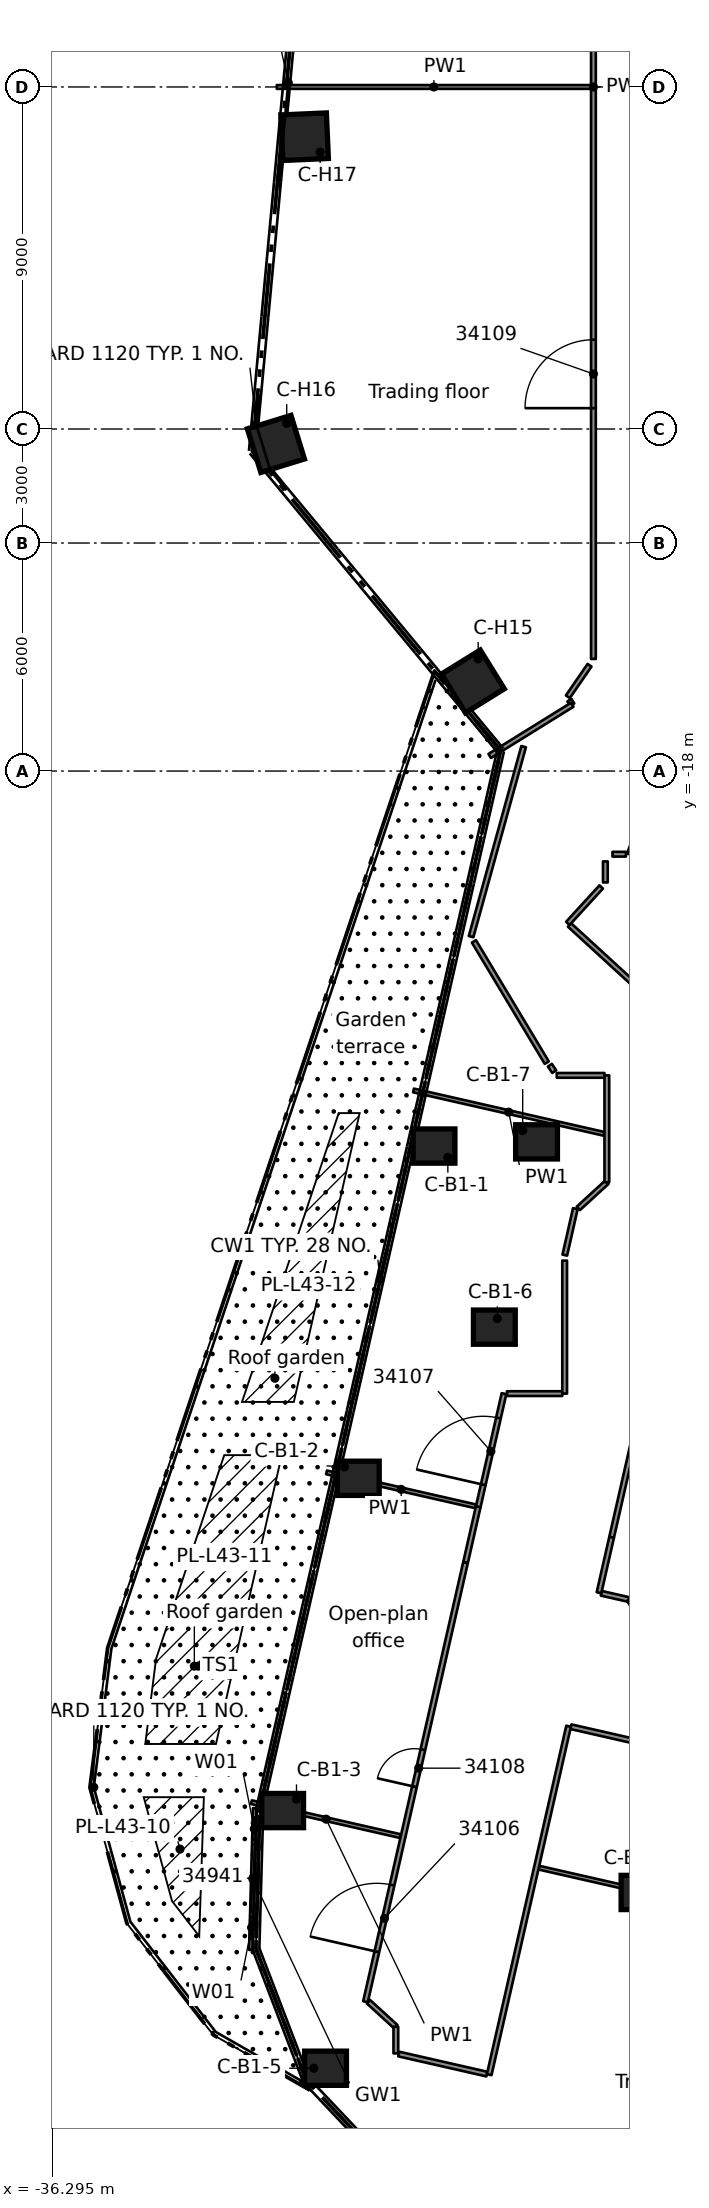
"""IFC4 building model, lengths in metres.
Left out: names, types, materials, properties, quantities, classifications, styles, units other than length and angle.
Written with IfcOpenShell. Run it as: python <this file> out.ifc"""

import sys

from ifc_helpers import new_model, si_unit, direction, frame, frame_2d, origin, origin_2d, place, context, subcontext, project, spatial, rectangle, extrude, element, fill, save


model = new_model("IFC4")
c1 = context("Model", 3, precision=1e-05, world=origin(), true_north=direction((0.0, 1.0)))
c2 = subcontext(c1, "Body", "Model", "MODEL_VIEW")
j1 = project(units=[si_unit("LENGTHUNIT", "METRE"), si_unit("PLANEANGLEUNIT", "RADIAN")], contexts=[c1])
p1 = place(None, origin())
s1 = spatial("IfcSite", under=j1, at=p1, CompositionType="ELEMENT")
p2 = place(p1, origin())
s2 = spatial("IfcBuilding", under=s1, at=p2, CompositionType="ELEMENT")
p3 = place(p2, frame((0.0, 0.0, 167.1)))
s3 = spatial("IfcBuildingStorey", under=s2, at=p3, CompositionType="ELEMENT", Elevation=167.1)
for number, where, z_axis, x_axis in (
    (1, (-26.245, -27.867, 0.0), (0.0, 0.0, 1.0), (1.0, 0.0, 0.0)),
    (2, (-28.237, -36.609, 0.0), (0.0, 0.0, 1.0), (1.0, 0.0, 0.0)),
    (3, (-30.228, -45.352, 0.0), (0.0, 0.0, 1.0), (1.0, 0.0, 0.0)),
    (4, (-29.099, -52.132, 0.0), (0.0, 0.0, 1.0), (1.0, 0.0, 0.0)),
    (5, (-24.657, -32.632, 0.0), (0.0, 0.0, 1.0), (1.0, 0.0, 0.0)),
    (6, (-23.547, -27.757, 0.0), (0.0, 0.0, 1.0), (1.0, 0.0, 0.0)),
    (7, (-20.771, -47.507, 0.0), (0.0, 0.0, 1.0), (1.0, 0.0, 0.0)),
):
    element("IfcColumn", number, at=place(p3, frame(where, z_axis=z_axis, x_axis=x_axis)), inside=s3, PredefinedType="COLUMN", context=c2, shape_type="SweptSolid", body=[
        extrude(rectangle(XDim=1.1, YDim=0.9, at=origin_2d()), origin(), (0.0, 0.0, 1.0), 3.5),
    ])
for number, where, z_axis, x_axis in (
    (8, (-25.222, -15.642, 0.0), (0.0, 0.0, 1.0), (-0.85, -0.527, 0.0)),
    (9, (-30.405, -9.392, 0.0), (0.0, 0.0, 1.0), (-0.955, -0.295, 0.0)),
    (10, (-29.65, -1.309, 0.0), (0.0, 0.0, 1.0), (-0.999, -0.044, 0.0)),
):
    element("IfcColumn", number, at=place(p3, frame(where, z_axis=z_axis, x_axis=x_axis)), inside=s3, PredefinedType="COLUMN", context=c2, shape_type="SweptSolid", body=[
        extrude(rectangle(XDim=1.2, YDim=1.2, at=origin_2d()), origin(), (0.0, 0.0, 1.0), 3.5),
    ])
p4 = place(p3, frame((-31.062, -49.018, 0.0), z_axis=(0.0, 0.0, 1.0), x_axis=(0.027750717401, 0.999614874681, 0.0)))
e11 = element("IfcWall", 11, at=p4, inside=s3, PredefinedType="STANDARD", context=c2, shape_type="SweptSolid", body=[
    extrude(rectangle(XDim=3.73, YDim=0.1, at=frame_2d((1.865, 0.0))), origin(), (0.0, 0.0, 1.0), 3.08),
])
p5 = place(p4, frame((0.986, 0.0, 0.0)))
e12 = element("IfcOpeningElement", 12, at=p5, cuts=e11, PredefinedType="OPENING", context=c2, shape_type="SweptSolid", body=[
    extrude(rectangle(XDim=1.8, YDim=2.4, at=frame_2d((0.9, 1.2))), frame((0.0, 0.06, 0.0), z_axis=(0.0, -1.0, 0.0), x_axis=(1.0, 0.0, 0.0)), (0.0, 0.0, 1.0), 0.12),
])
p6 = place(p4, frame((0.286, 0.0, 0.0)))
e13 = element("IfcOpeningElement", 13, at=p6, cuts=e11, PredefinedType="OPENING", context=c2, shape_type="SweptSolid", body=[
    extrude(rectangle(XDim=0.6, YDim=2.4, at=frame_2d((0.3, 1.2))), frame((0.0, 0.06, 0.0), z_axis=(0.0, -1.0, 0.0), x_axis=(1.0, 0.0, 0.0)), (0.0, 0.0, 1.0), 0.12),
])
p7 = place(p4, frame((2.886, 0.0, 0.0)))
e14 = element("IfcOpeningElement", 14, at=p7, cuts=e11, PredefinedType="OPENING", context=c2, shape_type="SweptSolid", body=[
    extrude(rectangle(XDim=0.6, YDim=2.4, at=frame_2d((0.3, 1.2))), frame((0.0, 0.06, 0.0), z_axis=(0.0, -1.0, 0.0), x_axis=(1.0, 0.0, 0.0)), (0.0, 0.0, 1.0), 0.12),
])
p8 = place(p3, frame((-25.194, -22.482, 0.0), z_axis=(0.0, 0.0, 1.0), x_axis=(0.514871972741, -0.857267083053, 0.0)))
e15 = element("IfcWall", 15, at=p8, inside=s3, PredefinedType="PARTITIONING", context=c2, shape_type="SweptSolid", body=[
    extrude(rectangle(XDim=3.721, YDim=0.125, at=frame_2d((1.861, 0.0))), origin(), (0.0, 0.0, 1.0), 3.06),
])
p9 = place(p3, frame((-22.682, -16.135, 0.0), z_axis=(0.0, 0.0, 1.0), x_axis=(0.530154156877, -0.847901273702, 0.0)))
e16 = element("IfcWall", 16, at=p9, inside=s3, PredefinedType="PARTITIONING", context=c2, shape_type="SweptSolid", body=[
    extrude(rectangle(XDim=0.141, YDim=0.125, at=frame_2d((0.071, 0.0))), origin(), (0.0, 0.0, 1.0), 3.06),
])
p10 = place(p3, frame((-23.196, -25.74, 0.0), z_axis=(0.0, 0.0, 1.0), x_axis=(0.562669402068, -0.826682008983, 0.0)))
e17 = element("IfcWall", 17, at=p10, inside=s3, PredefinedType="PARTITIONING", context=c2, shape_type="SweptSolid", body=[
    extrude(rectangle(XDim=0.204, YDim=0.125, at=frame_2d((0.102, 0.0))), origin(), (0.0, 0.0, 1.0), 3.06),
])
p11 = place(p3, frame((-22.678, -22.051, 0.0), z_axis=(0.0, 0.0, 1.0), x_axis=(0.737457793855, -0.675393220489, 0.0)))
e18 = element("IfcWall", 18, at=p11, inside=s3, PredefinedType="PARTITIONING", context=c2, shape_type="SweptSolid", body=[
    extrude(rectangle(XDim=3.737, YDim=0.125, at=frame_2d((1.869, 0.0))), origin(), (0.0, 0.0, 1.0), 3.06),
])
p12 = place(p3, frame((-27.173, -51.758, 0.0), z_axis=(0.0, 0.0, 1.0), x_axis=(0.975083442677, -0.221838409246, 0.0)))
e19 = element("IfcWall", 19, at=p12, inside=s3, PredefinedType="PARTITIONING", context=c2, shape_type="SweptSolid", body=[
    extrude(rectangle(XDim=2.379, YDim=0.125, at=frame_2d((1.19, 0.0))), origin(), (0.0, 0.0, 1.0), 3.06),
])
p13 = place(p3, frame((-31.049, -45.131, 0.0), z_axis=(0.0, 0.0, 1.0), x_axis=(0.975034558325, -0.222053169469, 0.0)))
e20 = element("IfcWall", 20, at=p13, inside=s3, PredefinedType="PARTITIONING", context=c2, shape_type="SweptSolid", body=[
    extrude(rectangle(XDim=4.03, YDim=0.1, at=frame_2d((2.015, 0.0))), origin(), (0.0, 0.0, 1.0), 3.06),
])
p14 = place(p3, frame((-23.487, -46.854, 0.0), z_axis=(0.0, 0.0, 1.0), x_axis=(0.975033161008, -0.222059304997, 0.0)))
e21 = element("IfcWall", 21, at=p14, inside=s3, PredefinedType="PARTITIONING", context=c2, shape_type="SweptSolid", body=[
    extrude(rectangle(XDim=24.007, YDim=0.1, at=frame_2d((12.004, 0.0))), origin(), (0.0, 0.0, 1.0), 3.06),
])
p15 = place(p3, frame((0.255, -48.363, 0.0), z_axis=(0.0, 0.0, 1.0), x_axis=(-0.975011387461, 0.222154888135, 0.0)))
e22 = element("IfcWall", 22, at=p15, inside=s3, PredefinedType="PARTITIONING", context=c2, shape_type="SweptSolid", body=[
    extrude(rectangle(XDim=23.484, YDim=0.125, at=frame_2d((11.742, 0.0))), origin(), (0.0, 0.0, 1.0), 3.06),
])
p16 = place(p15, frame((6.036, 0.0, 0.0)))
e23 = element("IfcOpeningElement", 23, at=p16, cuts=e22, PredefinedType="OPENING", context=c2, shape_type="SweptSolid", body=[
    extrude(rectangle(XDim=0.9, YDim=2.1, at=frame_2d((0.45, 1.05))), frame((0.0, 0.073, 0.0), z_axis=(0.0, -1.0, 0.0), x_axis=(1.0, 0.0, 0.0)), (0.0, 0.0, 1.0), 0.145),
])
p17 = place(p15, frame((15.494, 0.0, 0.0)))
e24 = element("IfcOpeningElement", 24, at=p17, cuts=e22, PredefinedType="OPENING", context=c2, shape_type="SweptSolid", body=[
    extrude(rectangle(XDim=1.1, YDim=2.1, at=frame_2d((0.55, 1.05))), frame((0.0, 0.073, 0.0), z_axis=(0.0, -1.0, 0.0), x_axis=(1.0, 0.0, 0.0)), (0.0, 0.0, 1.0), 0.145),
])
p18 = place(p3, frame((-21.842, -39.635, 0.0), z_axis=(0.0, 0.0, 1.0), x_axis=(0.975061856112, -0.221933270953, 0.0)))
e25 = element("IfcWall", 25, at=p18, inside=s3, PredefinedType="PARTITIONING", context=c2, shape_type="SweptSolid", body=[
    extrude(rectangle(XDim=0.744, YDim=0.125, at=frame_2d((0.372, 0.0))), origin(), (0.0, 0.0, 1.0), 3.06),
])
p19 = place(p3, frame((-29.073, -36.453, 0.0), z_axis=(0.0, 0.0, 1.0), x_axis=(0.975033390533, -0.222058297179, 0.0)))
e26 = element("IfcWall", 26, at=p19, inside=s3, PredefinedType="PARTITIONING", context=c2, shape_type="SweptSolid", body=[
    extrude(rectangle(XDim=4.031, YDim=0.1, at=frame_2d((2.015, 0.0))), origin(), (0.0, 0.0, 1.0), 3.06),
])
p20 = place(p3, frame((-26.784, -26.404, 0.0), z_axis=(0.0, 0.0, 1.0), x_axis=(0.975025922796, -0.22209108464, 0.0)))
e27 = element("IfcWall", 27, at=p20, inside=s3, PredefinedType="PARTITIONING", context=c2, shape_type="SweptSolid", body=[
    extrude(rectangle(XDim=5.141, YDim=0.1, at=frame_2d((2.571, 0.0))), origin(), (0.0, 0.0, 1.0), 3.06),
])
p21 = place(p3, frame((-27.97, -50.382, 0.0), z_axis=(0.0, 0.0, 1.0), x_axis=(0.738637101111, -0.67410328056, 0.0)))
e28 = element("IfcWall", 28, at=p21, inside=s3, PredefinedType="PARTITIONING", context=c2, shape_type="SweptSolid", body=[
    extrude(rectangle(XDim=0.976, YDim=0.125, at=frame_2d((0.488, 0.0))), origin(), (0.0, 0.0, 1.0), 3.06),
])
p22 = place(p3, frame((-24.325, -34.381, 0.0), z_axis=(0.0, 0.0, 1.0), x_axis=(1.0, 0.0, 0.0)))
e29 = element("IfcWall", 29, at=p22, inside=s3, PredefinedType="PARTITIONING", context=c2, shape_type="SweptSolid", body=[
    extrude(rectangle(XDim=1.456, YDim=0.125, at=frame_2d((0.728, 0.0))), origin(), (0.0, 0.0, 1.0), 3.06),
])
p23 = place(p3, frame((-22.447, -29.507, 0.0), z_axis=(0.0, 0.0, 1.0), x_axis=(0.737393225099, 0.67546371596, 0.0)))
e30 = element("IfcWall", 30, at=p23, inside=s3, PredefinedType="PARTITIONING", context=c2, shape_type="SweptSolid", body=[
    extrude(rectangle(XDim=1.017, YDim=0.125, at=frame_2d((0.509, 0.0))), origin(), (0.0, 0.0, 1.0), 3.06),
])
p24 = place(p3, frame((-23.014, -26.007, 0.0), z_axis=(0.0, 0.0, 1.0), x_axis=(1.0, 0.0, 0.0)))
e31 = element("IfcWall", 31, at=p24, inside=s3, PredefinedType="PARTITIONING", context=c2, shape_type="SweptSolid", body=[
    extrude(rectangle(XDim=1.255, YDim=0.125, at=frame_2d((0.627, 0.0))), origin(), (0.0, 0.0, 1.0), 3.06),
])
p25 = place(p3, frame((-21.548, -20.188, 0.0), z_axis=(0.0, 0.0, 1.0), x_axis=(1.0, 0.0, 0.0)))
e32 = element("IfcWall", 32, at=p25, inside=s3, PredefinedType="PARTITIONING", context=c2, shape_type="SweptSolid", body=[
    extrude(rectangle(XDim=0.354, YDim=0.125, at=frame_2d((0.177, 0.0))), origin(), (0.0, 0.0, 1.0), 3.06),
])
p26 = place(p3, frame((-30.382, 0.0, 0.0), z_axis=(0.0, 0.0, 1.0), x_axis=(1.0, 0.0, 0.0)))
e33 = element("IfcWall", 33, at=p26, inside=s3, PredefinedType="PARTITIONING", context=c2, shape_type="SweptSolid", body=[
    extrude(rectangle(XDim=8.269, YDim=0.1, at=frame_2d((4.135, 0.0))), origin(), (0.0, 0.0, 1.0), 3.06),
])
p27 = place(p3, frame((-24.779, -17.603, 0.0), z_axis=(0.0, 0.0, 1.0), x_axis=(0.849651970117, 0.527343843878, 0.0)))
e34 = element("IfcWall", 34, at=p27, inside=s3, PredefinedType="PARTITIONING", context=c2, shape_type="SweptSolid", body=[
    extrude(rectangle(XDim=2.556, YDim=0.125, at=frame_2d((1.278, 0.0))), origin(), (0.0, 0.0, 1.0), 3.06),
])
p28 = place(p3, frame((-22.724, -22.009, 0.0), z_axis=(0.0, 0.0, 1.0), x_axis=(0.675384834857, 0.737465473663, 0.0)))
e35 = element("IfcWall", 35, at=p28, inside=s3, PredefinedType="PARTITIONING", context=c2, shape_type="SweptSolid", body=[
    extrude(rectangle(XDim=1.302, YDim=0.125, at=frame_2d((0.651, 0.0))), origin(), (0.0, 0.0, 1.0), 3.06),
])
p29 = place(p3, frame((-22.723, -16.045, 0.0), z_axis=(0.0, 0.0, 1.0), x_axis=(0.567177272103, 0.823595739431, 0.0)))
e36 = element("IfcWall", 36, at=p29, inside=s3, PredefinedType="PARTITIONING", context=c2, shape_type="SweptSolid", body=[
    extrude(rectangle(XDim=1.006, YDim=0.125, at=frame_2d((0.503, 0.0))), origin(), (0.0, 0.0, 1.0), 3.06),
])
p30 = place(p3, frame((-21.104, -20.188, 0.0), z_axis=(0.0, 0.0, 1.0), x_axis=(0.345224027465, 0.938520309243, 0.0)))
e37 = element("IfcWall", 37, at=p30, inside=s3, PredefinedType="PARTITIONING", context=c2, shape_type="SweptSolid", body=[
    extrude(rectangle(XDim=1.857, YDim=0.125, at=frame_2d((0.929, 0.0))), origin(), (0.0, 0.0, 1.0), 3.06),
])
p31 = place(p3, frame((-23.886, -17.357, 0.0), z_axis=(0.0, 0.0, 1.0), x_axis=(-0.266648384372, -0.963793877918, 0.0)))
e38 = element("IfcWall", 38, at=p31, inside=s3, PredefinedType="PARTITIONING", context=c2, shape_type="SweptSolid", body=[
    extrude(rectangle(XDim=5.187, YDim=0.125, at=frame_2d((2.593, 0.0))), origin(), (0.0, 0.0, 1.0), 3.06),
])
p32 = place(p3, frame((-24.792, -52.3, 0.0), z_axis=(0.0, 0.0, 1.0), x_axis=(0.222197946193, 0.975001575746, 0.0)))
e39 = element("IfcWall", 39, at=p32, inside=s3, PredefinedType="PARTITIONING", context=c2, shape_type="SweptSolid", body=[
    extrude(rectangle(XDim=9.402, YDim=0.125, at=frame_2d((4.701, 0.0))), origin(), (0.0, 0.0, 1.0), 3.06),
])
p33 = place(p3, frame((-19.283, -28.115, 0.0), z_axis=(0.0, 0.0, 1.0), x_axis=(-0.222050161604, -0.975035243328, 0.0)))
e40 = element("IfcWall", 40, at=p33, inside=s3, PredefinedType="PARTITIONING", context=c2, shape_type="SweptSolid", body=[
    extrude(rectangle(XDim=10.304, YDim=0.125, at=frame_2d((5.152, 0.0))), origin(), (0.0, 0.0, 1.0), 3.06),
])
p34 = place(p33, frame((2.098, 0.0, 0.0)))
e41 = element("IfcOpeningElement", 41, at=p34, cuts=e40, PredefinedType="OPENING", context=c2, shape_type="SweptSolid", body=[
    extrude(rectangle(XDim=0.9, YDim=2.1, at=frame_2d((0.45, 1.05))), frame((0.0, 0.073, 0.0), z_axis=(0.0, -1.0, 0.0), x_axis=(1.0, 0.0, 0.0)), (0.0, 0.0, 1.0), 0.145),
])
p35 = place(p3, frame((-21.903, -39.621, 0.0), z_axis=(0.0, 0.0, 1.0), x_axis=(0.221903185503, 0.975068703356, 0.0)))
e42 = element("IfcWall", 42, at=p35, inside=s3, PredefinedType="PARTITIONING", context=c2, shape_type="SweptSolid", body=[
    extrude(rectangle(XDim=1.496, YDim=0.125, at=frame_2d((0.748, 0.0))), origin(), (0.0, 0.0, 1.0), 3.06),
])
p36 = place(p3, frame((-22.803, -30.737, 0.0), z_axis=(0.0, 0.0, 1.0), x_axis=(0.220947936247, 0.975285604051, 0.0)))
e43 = element("IfcWall", 43, at=p36, inside=s3, PredefinedType="PARTITIONING", context=c2, shape_type="SweptSolid", body=[
    extrude(rectangle(XDim=1.254, YDim=0.125, at=frame_2d((0.627, 0.0))), origin(), (0.0, 0.0, 1.0), 3.06),
])
p37 = place(p3, frame((-28.048, -50.382, 0.0), z_axis=(0.0, 0.0, 1.0), x_axis=(0.222119568242, 0.975019434372, 0.0)))
e44 = element("IfcWall", 44, at=p37, inside=s3, PredefinedType="PARTITIONING", context=c2, shape_type="SweptSolid", body=[
    extrude(rectangle(XDim=11.854, YDim=0.125, at=frame_2d((5.927, 0.0))), origin(), (0.0, 0.0, 1.0), 3.06),
])
p38 = place(p37, frame((1.35, 0.0, 0.0)))
e45 = element("IfcOpeningElement", 45, at=p38, cuts=e44, PredefinedType="OPENING", context=c2, shape_type="SweptSolid", body=[
    extrude(rectangle(XDim=1.8, YDim=2.1, at=frame_2d((0.9, 1.05))), frame((0.0, 0.073, 0.0), z_axis=(0.0, -1.0, 0.0), x_axis=(1.0, 0.0, 0.0)), (0.0, 0.0, 1.0), 0.145),
])
p39 = place(p37, frame((5.803, 0.0, 0.0)))
e46 = element("IfcOpeningElement", 46, at=p39, cuts=e44, PredefinedType="OPENING", context=c2, shape_type="SweptSolid", body=[
    extrude(rectangle(XDim=1.0, YDim=2.1, at=frame_2d((0.5, 1.05))), frame((0.0, 0.073, 0.0), z_axis=(0.0, -1.0, 0.0), x_axis=(1.0, 0.0, 0.0)), (0.0, 0.0, 1.0), 0.145),
])
p40 = place(p3, frame((-25.082, -37.362, 0.0), z_axis=(0.0, 0.0, 1.0), x_axis=(0.222145861705, 0.975013444075, 0.0)))
e47 = element("IfcWall", 47, at=p40, inside=s3, PredefinedType="PARTITIONING", context=c2, shape_type="SweptSolid", body=[
    extrude(rectangle(XDim=3.056, YDim=0.125, at=frame_2d((1.528, 0.0))), origin(), (0.0, 0.0, 1.0), 3.06),
])
p41 = place(p40, frame((0.6, 0.0, 0.0)))
e48 = element("IfcOpeningElement", 48, at=p41, cuts=e47, PredefinedType="OPENING", context=c2, shape_type="SweptSolid", body=[
    extrude(rectangle(XDim=1.8, YDim=2.1, at=frame_2d((0.9, 1.05))), frame((0.0, 0.073, 0.0), z_axis=(0.0, -1.0, 0.0), x_axis=(1.0, 0.0, 0.0)), (0.0, 0.0, 1.0), 0.145),
])
p42 = place(p3, frame((-25.414, -38.822, 0.0), z_axis=(0.0, 0.0, 1.0), x_axis=(0.221762057163, 0.975100810174, 0.0)))
e49 = element("IfcWall", 49, at=p42, inside=s3, PredefinedType="PARTITIONING", context=c2, shape_type="SweptSolid", body=[
    extrude(rectangle(XDim=1.497, YDim=0.125, at=frame_2d((0.749, 0.0))), origin(), (0.0, 0.0, 1.0), 3.06),
])
p43 = place(p3, frame((-20.629, -40.513, 0.0), z_axis=(0.0, 0.0, 1.0), x_axis=(-0.564896638824, 0.82516167352, 0.0)))
e50 = element("IfcWall", 50, at=p43, inside=s3, PredefinedType="PARTITIONING", context=c2, shape_type="SweptSolid", body=[
    extrude(rectangle(XDim=0.864, YDim=0.125, at=frame_2d((0.432, 0.0))), origin(), (0.0, 0.0, 1.0), 3.06),
])
p44 = place(p3, frame((-21.697, -28.82, 0.0), z_axis=(0.0, 0.0, 1.0), x_axis=(0.0, 1.0, 0.0)))
e51 = element("IfcWall", 51, at=p44, inside=s3, PredefinedType="PARTITIONING", context=c2, shape_type="SweptSolid", body=[
    extrude(rectangle(XDim=2.813, YDim=0.125, at=frame_2d((1.406, 0.0))), origin(), (0.0, 0.0, 1.0), 3.06),
])
p45 = place(p3, frame((-21.736, -20.931, 0.0), z_axis=(0.0, 0.0, 1.0), x_axis=(0.0, 1.0, 0.0)))
e52 = element("IfcWall", 52, at=p45, inside=s3, PredefinedType="PARTITIONING", context=c2, shape_type="SweptSolid", body=[
    extrude(rectangle(XDim=0.554, YDim=0.125, at=frame_2d((0.277, 0.0))), origin(), (0.0, 0.0, 1.0), 3.06),
])
p46 = place(p3, frame((-22.05, -15.051, 0.0), z_axis=(0.0, 0.0, 1.0), x_axis=(0.0, 1.0, 0.0)))
e53 = element("IfcWall", 53, at=p46, inside=s3, PredefinedType="PARTITIONING", context=c2, shape_type="SweptSolid", body=[
    extrude(rectangle(XDim=30.102, YDim=0.125, at=frame_2d((15.051, 0.0))), origin(), (0.0, 0.0, 1.0), 3.06),
])
p47 = place(p46, frame((6.6, 0.0, 0.0)))
e54 = element("IfcOpeningElement", 54, at=p47, cuts=e53, PredefinedType="OPENING", context=c2, shape_type="SweptSolid", body=[
    extrude(rectangle(XDim=1.8, YDim=2.1, at=frame_2d((0.9, 1.05))), frame((0.0, 0.073, 0.0), z_axis=(0.0, -1.0, 0.0), x_axis=(1.0, 0.0, 0.0)), (0.0, 0.0, 1.0), 0.145),
])
p48 = place(p46, frame((21.651, 0.0, 0.0)))
e55 = element("IfcOpeningElement", 55, at=p48, cuts=e53, PredefinedType="OPENING", context=c2, shape_type="SweptSolid", body=[
    extrude(rectangle(XDim=1.8, YDim=2.1, at=frame_2d((0.9, 1.05))), frame((0.0, 0.073, 0.0), z_axis=(0.0, -1.0, 0.0), x_axis=(1.0, 0.0, 0.0)), (0.0, 0.0, 1.0), 0.145),
])
p49 = place(p3, frame((-22.807, -34.381, 0.0), z_axis=(0.0, 0.0, 1.0), x_axis=(0.0, 1.0, 0.0)))
e56 = element("IfcWall", 56, at=p49, inside=s3, PredefinedType="PARTITIONING", context=c2, shape_type="SweptSolid", body=[
    extrude(rectangle(XDim=3.499, YDim=0.125, at=frame_2d((1.75, 0.0))), origin(), (0.0, 0.0, 1.0), 3.06),
])
p50 = place(p3, frame((-27.249, -51.741, 0.0), z_axis=(0.0, 0.0, 1.0), x_axis=(0.0, 1.0, 0.0)))
e57 = element("IfcWall", 57, at=p50, inside=s3, PredefinedType="PARTITIONING", context=c2, shape_type="SweptSolid", body=[
    extrude(rectangle(XDim=0.701, YDim=0.125, at=frame_2d((0.351, 0.0))), origin(), (0.0, 0.0, 1.0), 3.06),
])
p51 = place(p5, origin())
e58 = element("IfcDoor", 58, at=p51, inside=s3, OperationType="DOUBLE_DOOR_SLIDING", PredefinedType="DOOR", context=c2, shape_type="SweptSolid", body=[
    extrude(rectangle(XDim=1.8, YDim=2.4, at=frame_2d((0.9, 1.2))), frame((0.0, 0.025, 0.0), z_axis=(0.0, -1.0, 0.0), x_axis=(1.0, 0.0, 0.0)), (0.0, 0.0, 1.0), 0.05),
])
fill(e12, e58)
p52 = place(p6, origin())
e59 = element("IfcWindow", 59, at=p52, inside=s3, PartitioningType="SINGLE_PANEL", PredefinedType="WINDOW", context=c2, shape_type="SweptSolid", body=[
    extrude(rectangle(XDim=0.6, YDim=2.4, at=frame_2d((0.3, 1.2))), frame((0.0, 0.03, 0.0), z_axis=(0.0, -1.0, 0.0), x_axis=(1.0, 0.0, 0.0)), (0.0, 0.0, 1.0), 0.06),
])
fill(e13, e59)
p53 = place(p7, origin())
e60 = element("IfcWindow", 60, at=p53, inside=s3, PartitioningType="SINGLE_PANEL", PredefinedType="WINDOW", context=c2, shape_type="SweptSolid", body=[
    extrude(rectangle(XDim=0.6, YDim=2.4, at=frame_2d((0.3, 1.2))), frame((0.0, 0.03, 0.0), z_axis=(0.0, -1.0, 0.0), x_axis=(1.0, 0.0, 0.0)), (0.0, 0.0, 1.0), 0.06),
])
fill(e14, e60)
p54 = place(p38, origin())
e61 = element("IfcDoor", 61, at=p54, inside=s3, OperationType="DOUBLE_DOOR_SINGLE_SWING", PredefinedType="DOOR", context=c2, shape_type="SweptSolid", body=[
    extrude(rectangle(XDim=1.8, YDim=2.1, at=frame_2d((0.9, 1.05))), frame((0.0, 0.025, 0.0), z_axis=(0.0, -1.0, 0.0), x_axis=(1.0, 0.0, 0.0)), (0.0, 0.0, 1.0), 0.05),
])
fill(e45, e61)
p55 = place(p41, origin())
e62 = element("IfcDoor", 62, at=p55, inside=s3, OperationType="DOUBLE_DOOR_SINGLE_SWING", PredefinedType="DOOR", context=c2, shape_type="SweptSolid", body=[
    extrude(rectangle(XDim=1.8, YDim=2.1, at=frame_2d((0.9, 1.05))), frame((0.0, 0.025, 0.0), z_axis=(0.0, -1.0, 0.0), x_axis=(1.0, 0.0, 0.0)), (0.0, 0.0, 1.0), 0.05),
])
fill(e48, e62)
p56 = place(p39, origin())
e63 = element("IfcDoor", 63, at=p56, inside=s3, OperationType="SINGLE_SWING_RIGHT", PredefinedType="DOOR", context=c2, shape_type="SweptSolid", body=[
    extrude(rectangle(XDim=1.0, YDim=2.1, at=frame_2d((0.5, 1.05))), frame((0.0, 0.025, 0.0), z_axis=(0.0, -1.0, 0.0), x_axis=(1.0, 0.0, 0.0)), (0.0, 0.0, 1.0), 0.05),
])
fill(e46, e63)
p57 = place(p47, origin())
e64 = element("IfcDoor", 64, at=p57, inside=s3, OperationType="DOUBLE_DOOR_SINGLE_SWING", PredefinedType="DOOR", context=c2, shape_type="SweptSolid", body=[
    extrude(rectangle(XDim=1.8, YDim=2.1, at=frame_2d((0.9, 1.05))), frame((0.0, 0.025, 0.0), z_axis=(0.0, -1.0, 0.0), x_axis=(1.0, 0.0, 0.0)), (0.0, 0.0, 1.0), 0.05),
])
fill(e54, e64)
save(model, sys.argv[1])
